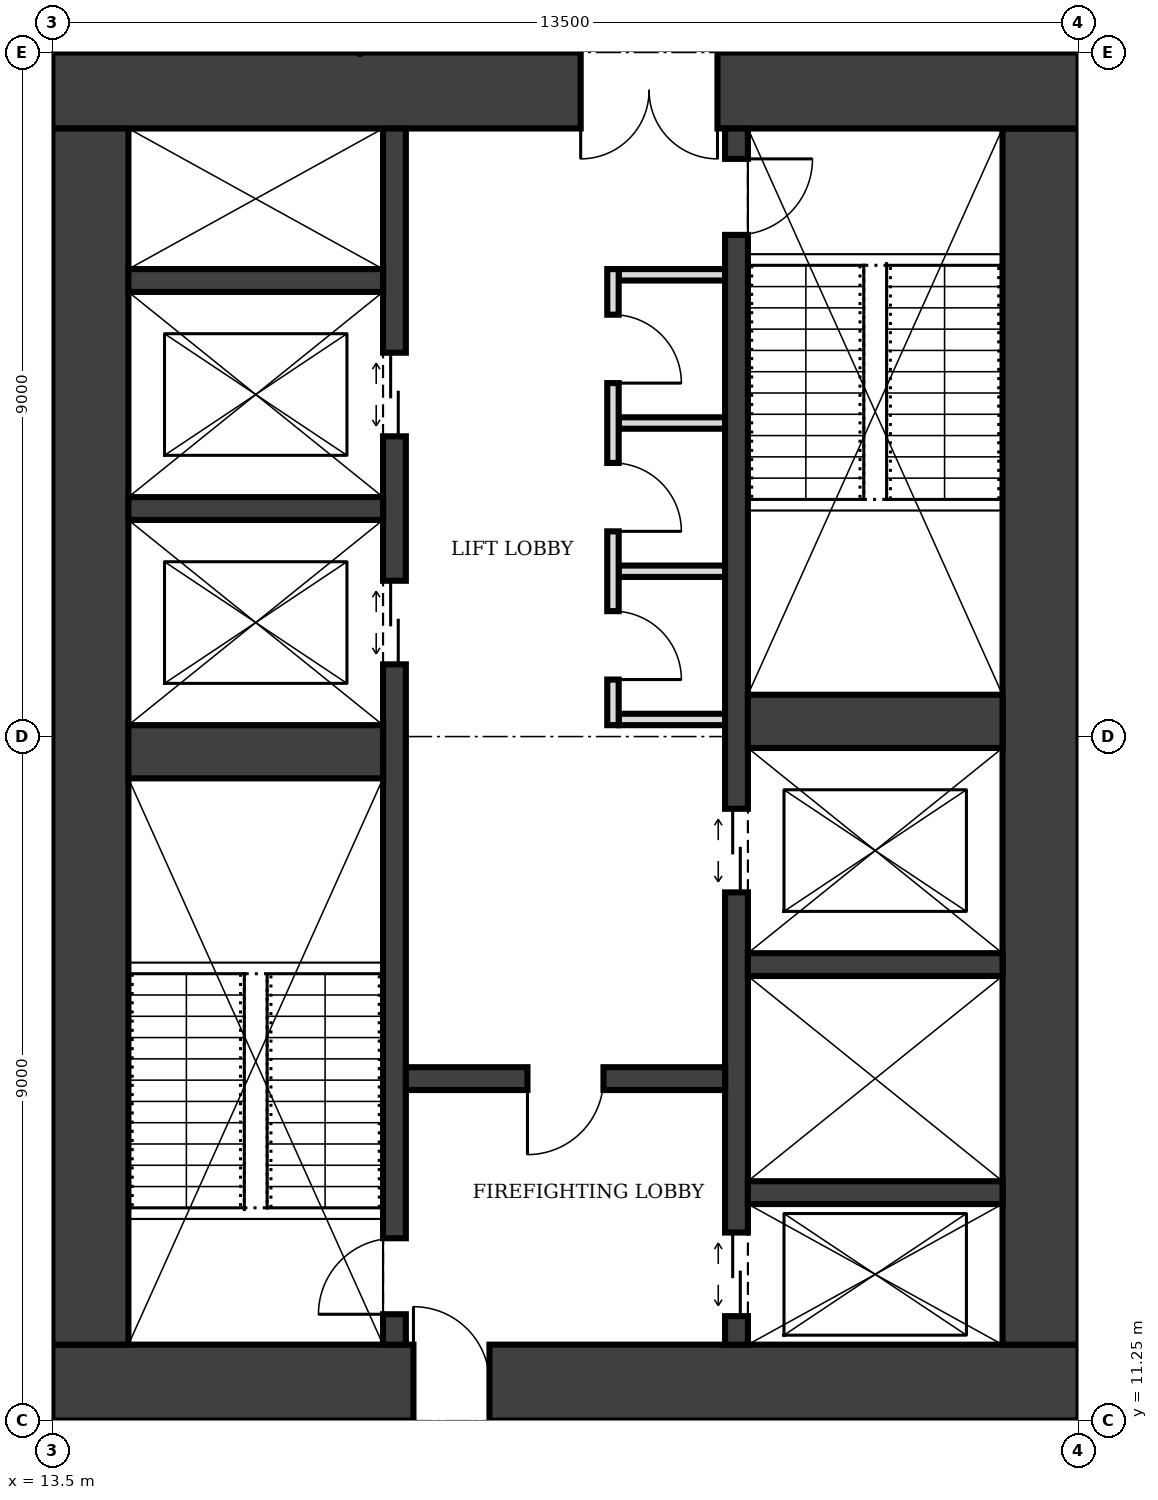
"""IFC4 building model, lengths in metres.
Left out: names, types, materials, properties, quantities, classifications, styles, units other than length and angle.
Written with IfcOpenShell. Run it as: python <this file> out.ifc"""

import sys

from ifc_helpers import new_model, si_unit, direction, frame, frame_2d, origin, place, context, subcontext, project, spatial, rectangle, extrude, element, fill, save


model = new_model("IFC4")
c1 = context("Model", 3, precision=1e-05, world=origin(), true_north=direction((0.0, 1.0)))
c2 = subcontext(c1, "Body", "Model", "MODEL_VIEW")
j1 = project(units=[si_unit("LENGTHUNIT", "METRE"), si_unit("PLANEANGLEUNIT", "RADIAN")], contexts=[c1])
p1 = place(None, origin())
s1 = spatial("IfcSite", under=j1, at=p1, CompositionType="ELEMENT")
p2 = place(p1, origin())
s2 = spatial("IfcBuilding", under=s1, at=p2, CompositionType="ELEMENT")
p3 = place(p2, frame((0.0, 0.0, 65.0)))
s3 = spatial("IfcBuildingStorey", under=s2, at=p3, CompositionType="ELEMENT", Elevation=65.0)
p4 = place(p3, frame((13.5, 11.75, 0.0), z_axis=(0.0, 0.0, 1.0), x_axis=(1.0, 0.0, 0.0)))
e1 = element("IfcWall", 1, at=p4, inside=s3, PredefinedType="SHEAR", context=c2, shape_type="SweptSolid", body=[
    extrude(rectangle(XDim=13.5, YDim=1.0, at=frame_2d((6.75, 0.0))), origin(), (0.0, 0.0, 1.0), 4.0),
])
p5 = place(p4, frame((4.75, 0.0, 0.0)))
e2 = element("IfcOpeningElement", 2, at=p5, cuts=e1, PredefinedType="OPENING", context=c2, shape_type="SweptSolid", body=[
    extrude(rectangle(XDim=1.0, YDim=2.1, at=frame_2d((0.5, 1.05))), frame((0.0, 0.51, 0.0), z_axis=(0.0, -1.0, 0.0), x_axis=(1.0, 0.0, 0.0)), (0.0, 0.0, 1.0), 1.02),
])
p6 = place(p3, frame((26.5, 12.25, 0.0), z_axis=(0.0, 0.0, 1.0), x_axis=(0.0, 1.0, 0.0)))
e3 = element("IfcWall", 3, at=p6, inside=s3, PredefinedType="SHEAR", context=c2, shape_type="SweptSolid", body=[
    extrude(rectangle(XDim=16.0, YDim=1.0, at=frame_2d((8.0, 0.0))), origin(), (0.0, 0.0, 1.0), 4.0),
])
p7 = place(p3, frame((27.0, 28.75, 0.0), z_axis=(0.0, 0.0, 1.0), x_axis=(-1.0, 0.0, 0.0)))
e4 = element("IfcWall", 4, at=p7, inside=s3, PredefinedType="SHEAR", context=c2, shape_type="SweptSolid", body=[
    extrude(rectangle(XDim=13.5, YDim=1.0, at=frame_2d((6.75, 0.0))), origin(), (0.0, 0.0, 1.0), 4.0),
])
p8 = place(p7, frame((4.75, 0.0, 0.0)))
e5 = element("IfcOpeningElement", 5, at=p8, cuts=e4, PredefinedType="OPENING", context=c2, shape_type="SweptSolid", body=[
    extrude(rectangle(XDim=1.8, YDim=2.1, at=frame_2d((0.9, 1.05))), frame((0.0, 0.51, 0.0), z_axis=(0.0, -1.0, 0.0), x_axis=(1.0, 0.0, 0.0)), (0.0, 0.0, 1.0), 1.02),
])
p9 = place(p3, frame((14.0, 28.25, 0.0), z_axis=(0.0, 0.0, 1.0), x_axis=(0.0, -1.0, 0.0)))
e6 = element("IfcWall", 6, at=p9, inside=s3, PredefinedType="SHEAR", context=c2, shape_type="SweptSolid", body=[
    extrude(rectangle(XDim=16.0, YDim=1.0, at=frame_2d((8.0, 0.0))), origin(), (0.0, 0.0, 1.0), 4.0),
])
p10 = place(p3, frame((18.0, 12.25, 0.0), z_axis=(0.0, 0.0, 1.0), x_axis=(0.0, 1.0, 0.0)))
e7 = element("IfcWall", 7, at=p10, inside=s3, PredefinedType="SHEAR", context=c2, shape_type="SweptSolid", body=[
    extrude(rectangle(XDim=16.0, YDim=0.3, at=frame_2d((8.0, 0.0))), origin(), (0.0, 0.0, 1.0), 4.0),
])
p11 = place(p10, frame((0.4, 0.0, 0.0)))
e8 = element("IfcOpeningElement", 8, at=p11, cuts=e7, PredefinedType="OPENING", context=c2, shape_type="SweptSolid", body=[
    extrude(rectangle(XDim=1.0, YDim=2.1, at=frame_2d((0.5, 1.05))), frame((0.0, 0.16, 0.0), z_axis=(0.0, -1.0, 0.0), x_axis=(1.0, 0.0, 0.0)), (0.0, 0.0, 1.0), 0.32),
])
p12 = place(p10, frame((8.95, 0.0, 0.0)))
e9 = element("IfcOpeningElement", 9, at=p12, cuts=e7, PredefinedType="OPENING", context=c2, shape_type="SweptSolid", body=[
    extrude(rectangle(XDim=1.1, YDim=2.1, at=frame_2d((0.55, 1.05))), frame((0.0, 0.16, 0.0), z_axis=(0.0, -1.0, 0.0), x_axis=(1.0, 0.0, 0.0)), (0.0, 0.0, 1.0), 0.32),
])
p13 = place(p10, frame((11.95, 0.0, 0.0)))
e10 = element("IfcOpeningElement", 10, at=p13, cuts=e7, PredefinedType="OPENING", context=c2, shape_type="SweptSolid", body=[
    extrude(rectangle(XDim=1.1, YDim=2.1, at=frame_2d((0.55, 1.05))), frame((0.0, 0.16, 0.0), z_axis=(0.0, -1.0, 0.0), x_axis=(1.0, 0.0, 0.0)), (0.0, 0.0, 1.0), 0.32),
])
p14 = place(p3, frame((22.5, 12.25, 0.0), z_axis=(0.0, 0.0, 1.0), x_axis=(0.0, 1.0, 0.0)))
e11 = element("IfcWall", 11, at=p14, inside=s3, PredefinedType="SHEAR", context=c2, shape_type="SweptSolid", body=[
    extrude(rectangle(XDim=16.0, YDim=0.3, at=frame_2d((8.0, 0.0))), origin(), (0.0, 0.0, 1.0), 4.0),
])
p15 = place(p14, frame((14.6, 0.0, 0.0)))
e12 = element("IfcOpeningElement", 12, at=p15, cuts=e11, PredefinedType="OPENING", context=c2, shape_type="SweptSolid", body=[
    extrude(rectangle(XDim=1.0, YDim=2.1, at=frame_2d((0.5, 1.05))), frame((0.0, 0.16, 0.0), z_axis=(0.0, -1.0, 0.0), x_axis=(1.0, 0.0, 0.0)), (0.0, 0.0, 1.0), 0.32),
])
p16 = place(p14, frame((0.375, 0.0, 0.0)))
e13 = element("IfcOpeningElement", 13, at=p16, cuts=e11, PredefinedType="OPENING", context=c2, shape_type="SweptSolid", body=[
    extrude(rectangle(XDim=1.1, YDim=2.1, at=frame_2d((0.55, 1.05))), frame((0.0, 0.16, 0.0), z_axis=(0.0, -1.0, 0.0), x_axis=(1.0, 0.0, 0.0)), (0.0, 0.0, 1.0), 0.32),
])
p17 = place(p14, frame((5.95, 0.0, 0.0)))
e14 = element("IfcOpeningElement", 14, at=p17, cuts=e11, PredefinedType="OPENING", context=c2, shape_type="SweptSolid", body=[
    extrude(rectangle(XDim=1.1, YDim=2.1, at=frame_2d((0.55, 1.05))), frame((0.0, 0.16, 0.0), z_axis=(0.0, -1.0, 0.0), x_axis=(1.0, 0.0, 0.0)), (0.0, 0.0, 1.0), 0.32),
])
p18 = place(p3, frame((14.5, 20.05, 0.0), z_axis=(0.0, 0.0, 1.0), x_axis=(1.0, 0.0, 0.0)))
e15 = element("IfcWall", 15, at=p18, inside=s3, PredefinedType="SHEAR", context=c2, shape_type="SweptSolid", body=[
    extrude(rectangle(XDim=3.35, YDim=0.7, at=frame_2d((1.675, 0.0))), origin(), (0.0, 0.0, 1.0), 4.0),
])
p19 = place(p3, frame((18.15, 15.75, 0.0), z_axis=(0.0, 0.0, 1.0), x_axis=(1.0, 0.0, 0.0)))
e16 = element("IfcWall", 16, at=p19, inside=s3, PredefinedType="SHEAR", context=c2, shape_type="SweptSolid", body=[
    extrude(rectangle(XDim=4.2, YDim=0.3, at=frame_2d((2.1, 0.0))), origin(), (0.0, 0.0, 1.0), 4.0),
])
p20 = place(p19, frame((1.6, 0.0, 0.0)))
e17 = element("IfcOpeningElement", 17, at=p20, cuts=e16, PredefinedType="OPENING", context=c2, shape_type="SweptSolid", body=[
    extrude(rectangle(XDim=1.0, YDim=2.1, at=frame_2d((0.5, 1.05))), frame((0.0, 0.16, 0.0), z_axis=(0.0, -1.0, 0.0), x_axis=(1.0, 0.0, 0.0)), (0.0, 0.0, 1.0), 0.32),
])
for number, where, z_axis, x_axis in (
    (18, (22.65, 14.25, 0.0), (0.0, 0.0, 1.0), (1.0, 0.0, 0.0)),
    (19, (22.65, 17.25, 0.0), (0.0, 0.0, 1.0), (1.0, 0.0, 0.0)),
):
    element("IfcWall", number, at=place(p3, frame(where, z_axis=z_axis, x_axis=x_axis)), inside=s3, PredefinedType="SHEAR", context=c2, shape_type="SweptSolid", body=[
        extrude(rectangle(XDim=3.35, YDim=0.3, at=frame_2d((1.675, 0.0))), origin(), (0.0, 0.0, 1.0), 4.0),
    ])
p21 = place(p3, frame((22.65, 20.45, 0.0), z_axis=(0.0, 0.0, 1.0), x_axis=(1.0, 0.0, 0.0)))
e20 = element("IfcWall", 20, at=p21, inside=s3, PredefinedType="SHEAR", context=c2, shape_type="SweptSolid", body=[
    extrude(rectangle(XDim=3.35, YDim=0.7, at=frame_2d((1.675, 0.0))), origin(), (0.0, 0.0, 1.0), 4.0),
])
for number, where, z_axis, x_axis in (
    (21, (14.5, 23.25, 0.0), (0.0, 0.0, 1.0), (1.0, 0.0, 0.0)),
    (22, (14.5, 26.25, 0.0), (0.0, 0.0, 1.0), (1.0, 0.0, 0.0)),
):
    element("IfcWall", number, at=place(p3, frame(where, z_axis=z_axis, x_axis=x_axis)), inside=s3, PredefinedType="SHEAR", context=c2, shape_type="SweptSolid", body=[
        extrude(rectangle(XDim=3.35, YDim=0.3, at=frame_2d((1.675, 0.0))), origin(), (0.0, 0.0, 1.0), 4.0),
    ])
p22 = place(p3, frame((20.875, 20.4, 0.0), z_axis=(0.0, 0.0, 1.0), x_axis=(0.0, 1.0, 0.0)))
e23 = element("IfcWall", 23, at=p22, inside=s3, PredefinedType="PARTITIONING", context=c2, shape_type="SweptSolid", body=[
    extrude(rectangle(XDim=6.0, YDim=0.15, at=frame_2d((3.0, 0.0))), origin(), (0.0, 0.0, 1.0), 3.75),
])
p23 = place(p22, frame((0.6, 0.0, 0.0)))
e24 = element("IfcOpeningElement", 24, at=p23, cuts=e23, PredefinedType="OPENING", context=c2, shape_type="SweptSolid", body=[
    extrude(rectangle(XDim=0.9, YDim=2.1, at=frame_2d((0.45, 1.05))), frame((0.0, 0.085, 0.0), z_axis=(0.0, -1.0, 0.0), x_axis=(1.0, 0.0, 0.0)), (0.0, 0.0, 1.0), 0.17),
])
p24 = place(p22, frame((2.55, 0.0, 0.0)))
e25 = element("IfcOpeningElement", 25, at=p24, cuts=e23, PredefinedType="OPENING", context=c2, shape_type="SweptSolid", body=[
    extrude(rectangle(XDim=0.9, YDim=2.1, at=frame_2d((0.45, 1.05))), frame((0.0, 0.085, 0.0), z_axis=(0.0, -1.0, 0.0), x_axis=(1.0, 0.0, 0.0)), (0.0, 0.0, 1.0), 0.17),
])
p25 = place(p22, frame((4.5, 0.0, 0.0)))
e26 = element("IfcOpeningElement", 26, at=p25, cuts=e23, PredefinedType="OPENING", context=c2, shape_type="SweptSolid", body=[
    extrude(rectangle(XDim=0.9, YDim=2.1, at=frame_2d((0.45, 1.05))), frame((0.0, 0.085, 0.0), z_axis=(0.0, -1.0, 0.0), x_axis=(1.0, 0.0, 0.0)), (0.0, 0.0, 1.0), 0.17),
])
for number, where, z_axis, x_axis in (
    (27, (20.95, 20.475, 0.0), (0.0, 0.0, 1.0), (1.0, 0.0, 0.0)),
    (28, (20.95, 22.425, 0.0), (0.0, 0.0, 1.0), (1.0, 0.0, 0.0)),
    (29, (20.95, 24.375, 0.0), (0.0, 0.0, 1.0), (1.0, 0.0, 0.0)),
    (30, (20.95, 26.325, 0.0), (0.0, 0.0, 1.0), (1.0, 0.0, 0.0)),
):
    element("IfcWall", number, at=place(p3, frame(where, z_axis=z_axis, x_axis=x_axis)), inside=s3, PredefinedType="PARTITIONING", context=c2, shape_type="SweptSolid", body=[
        extrude(rectangle(XDim=1.4, YDim=0.15, at=frame_2d((0.7, 0.0))), origin(), (0.0, 0.0, 1.0), 3.75),
    ])
p26 = place(p5, origin())
e31 = element("IfcDoor", 31, at=p26, inside=s3, OperationType="SINGLE_SWING_LEFT", PredefinedType="DOOR", context=c2, shape_type="SweptSolid", body=[
    extrude(rectangle(XDim=1.0, YDim=2.1, at=frame_2d((0.5, 1.05))), frame((0.0, 0.025, 0.0), z_axis=(0.0, -1.0, 0.0), x_axis=(1.0, 0.0, 0.0)), (0.0, 0.0, 1.0), 0.05),
])
fill(e2, e31)
p27 = place(p8, origin())
e32 = element("IfcDoor", 32, at=p27, inside=s3, OperationType="DOUBLE_DOOR_SINGLE_SWING", PredefinedType="DOOR", context=c2, shape_type="SweptSolid", body=[
    extrude(rectangle(XDim=1.8, YDim=2.1, at=frame_2d((0.9, 1.05))), frame((0.0, 0.025, 0.0), z_axis=(0.0, -1.0, 0.0), x_axis=(1.0, 0.0, 0.0)), (0.0, 0.0, 1.0), 0.05),
])
fill(e5, e32)
p28 = place(p20, frame((1.0, 0.0, 0.0), z_axis=(0.0, 0.0, 1.0), x_axis=(-1.0, 0.0, 0.0)))
e33 = element("IfcDoor", 33, at=p28, inside=s3, OperationType="SINGLE_SWING_RIGHT", PredefinedType="DOOR", context=c2, shape_type="SweptSolid", body=[
    extrude(rectangle(XDim=1.0, YDim=2.1, at=frame_2d((0.5, 1.05))), frame((0.0, 0.025, 0.0), z_axis=(0.0, -1.0, 0.0), x_axis=(1.0, 0.0, 0.0)), (0.0, 0.0, 1.0), 0.05),
])
fill(e17, e33)
p29 = place(p11, origin())
e34 = element("IfcDoor", 34, at=p29, inside=s3, OperationType="SINGLE_SWING_LEFT", PredefinedType="DOOR", context=c2, shape_type="SweptSolid", body=[
    extrude(rectangle(XDim=1.0, YDim=2.1, at=frame_2d((0.5, 1.05))), frame((0.0, 0.025, 0.0), z_axis=(0.0, -1.0, 0.0), x_axis=(1.0, 0.0, 0.0)), (0.0, 0.0, 1.0), 0.05),
])
fill(e8, e34)
p30 = place(p15, frame((1.0, 0.0, 0.0), z_axis=(0.0, 0.0, 1.0), x_axis=(-1.0, 0.0, 0.0)))
e35 = element("IfcDoor", 35, at=p30, inside=s3, OperationType="SINGLE_SWING_LEFT", PredefinedType="DOOR", context=c2, shape_type="SweptSolid", body=[
    extrude(rectangle(XDim=1.0, YDim=2.1, at=frame_2d((0.5, 1.05))), frame((0.0, 0.025, 0.0), z_axis=(0.0, -1.0, 0.0), x_axis=(1.0, 0.0, 0.0)), (0.0, 0.0, 1.0), 0.05),
])
fill(e12, e35)
p31 = place(p16, origin())
e36 = element("IfcDoor", 36, at=p31, inside=s3, OperationType="DOUBLE_DOOR_SLIDING", PredefinedType="DOOR", context=c2, shape_type="SweptSolid", body=[
    extrude(rectangle(XDim=1.1, YDim=2.1, at=frame_2d((0.55, 1.05))), frame((0.0, 0.025, 0.0), z_axis=(0.0, -1.0, 0.0), x_axis=(1.0, 0.0, 0.0)), (0.0, 0.0, 1.0), 0.05),
])
fill(e13, e36)
p32 = place(p12, origin())
e37 = element("IfcDoor", 37, at=p32, inside=s3, OperationType="DOUBLE_DOOR_SLIDING", PredefinedType="DOOR", context=c2, shape_type="SweptSolid", body=[
    extrude(rectangle(XDim=1.1, YDim=2.1, at=frame_2d((0.55, 1.05))), frame((0.0, 0.025, 0.0), z_axis=(0.0, -1.0, 0.0), x_axis=(1.0, 0.0, 0.0)), (0.0, 0.0, 1.0), 0.05),
])
fill(e9, e37)
p33 = place(p13, origin())
e38 = element("IfcDoor", 38, at=p33, inside=s3, OperationType="DOUBLE_DOOR_SLIDING", PredefinedType="DOOR", context=c2, shape_type="SweptSolid", body=[
    extrude(rectangle(XDim=1.1, YDim=2.1, at=frame_2d((0.55, 1.05))), frame((0.0, 0.025, 0.0), z_axis=(0.0, -1.0, 0.0), x_axis=(1.0, 0.0, 0.0)), (0.0, 0.0, 1.0), 0.05),
])
fill(e10, e38)
p34 = place(p17, origin())
e39 = element("IfcDoor", 39, at=p34, inside=s3, OperationType="DOUBLE_DOOR_SLIDING", PredefinedType="DOOR", context=c2, shape_type="SweptSolid", body=[
    extrude(rectangle(XDim=1.1, YDim=2.1, at=frame_2d((0.55, 1.05))), frame((0.0, 0.025, 0.0), z_axis=(0.0, -1.0, 0.0), x_axis=(1.0, 0.0, 0.0)), (0.0, 0.0, 1.0), 0.05),
])
fill(e14, e39)
p35 = place(p23, frame((0.9, 0.0, 0.0), z_axis=(0.0, 0.0, 1.0), x_axis=(-1.0, 0.0, 0.0)))
e40 = element("IfcDoor", 40, at=p35, inside=s3, OperationType="SINGLE_SWING_RIGHT", PredefinedType="DOOR", context=c2, shape_type="SweptSolid", body=[
    extrude(rectangle(XDim=0.9, YDim=2.1, at=frame_2d((0.45, 1.05))), frame((0.0, 0.025, 0.0), z_axis=(0.0, -1.0, 0.0), x_axis=(1.0, 0.0, 0.0)), (0.0, 0.0, 1.0), 0.05),
])
fill(e24, e40)
p36 = place(p24, frame((0.9, 0.0, 0.0), z_axis=(0.0, 0.0, 1.0), x_axis=(-1.0, 0.0, 0.0)))
e41 = element("IfcDoor", 41, at=p36, inside=s3, OperationType="SINGLE_SWING_RIGHT", PredefinedType="DOOR", context=c2, shape_type="SweptSolid", body=[
    extrude(rectangle(XDim=0.9, YDim=2.1, at=frame_2d((0.45, 1.05))), frame((0.0, 0.025, 0.0), z_axis=(0.0, -1.0, 0.0), x_axis=(1.0, 0.0, 0.0)), (0.0, 0.0, 1.0), 0.05),
])
fill(e25, e41)
p37 = place(p25, frame((0.9, 0.0, 0.0), z_axis=(0.0, 0.0, 1.0), x_axis=(-1.0, 0.0, 0.0)))
e42 = element("IfcDoor", 42, at=p37, inside=s3, OperationType="SINGLE_SWING_RIGHT", PredefinedType="DOOR", context=c2, shape_type="SweptSolid", body=[
    extrude(rectangle(XDim=0.9, YDim=2.1, at=frame_2d((0.45, 1.05))), frame((0.0, 0.025, 0.0), z_axis=(0.0, -1.0, 0.0), x_axis=(1.0, 0.0, 0.0)), (0.0, 0.0, 1.0), 0.05),
])
fill(e26, e42)
save(model, sys.argv[1])
